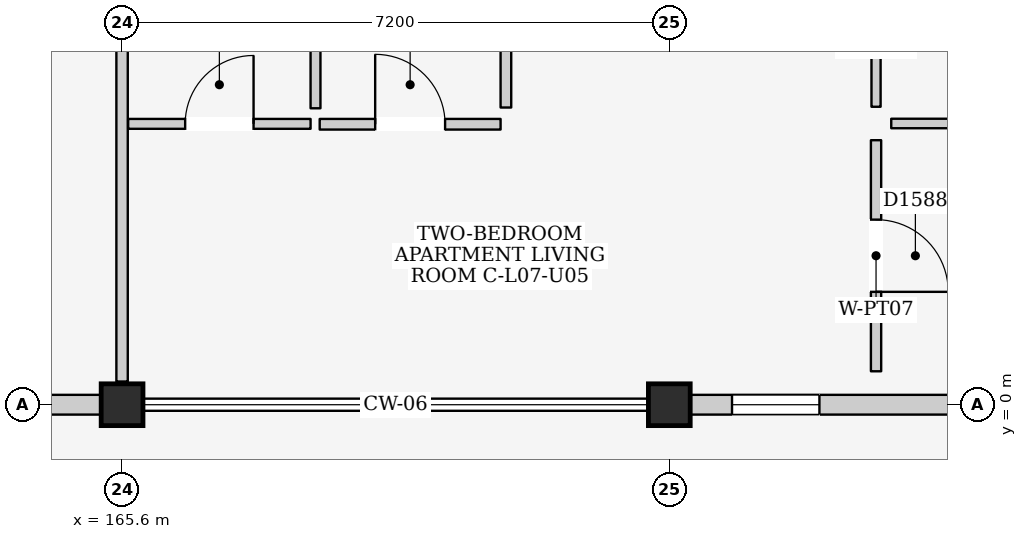
"""IFC4 building model, lengths in metres.
Left out: names, types, materials, properties, quantities, classifications, styles, units other than length and angle.
Written with IfcOpenShell. Run it as: python <this file> out.ifc"""

import sys

from ifc_helpers import new_model, si_unit, direction, frame, frame_2d, origin, origin_2d, place, context, subcontext, project, spatial, rectangle, extrude, element, fill, save


model = new_model("IFC4")
c1 = context("Model", 3, precision=1e-05, world=origin(), true_north=direction((0.0, 1.0)))
c2 = subcontext(c1, "Body", "Model", "MODEL_VIEW")
j1 = project(units=[si_unit("LENGTHUNIT", "METRE"), si_unit("PLANEANGLEUNIT", "RADIAN")], contexts=[c1])
p1 = place(None, origin())
s1 = spatial("IfcSite", under=j1, at=p1, CompositionType="ELEMENT")
p2 = place(p1, origin())
s2 = spatial("IfcBuilding", under=s1, at=p2, CompositionType="ELEMENT")
p3 = place(p2, frame((0.0, 0.0, 25.1)))
s3 = spatial("IfcBuildingStorey", under=s2, at=p3, CompositionType="ELEMENT", Elevation=25.1)
for number, where, z_axis, x_axis in (
    (1, (165.6, 0.0, 0.0), (0.0, 0.0, 1.0), (1.0, 0.0, 0.0)),
    (2, (172.8, 0.0, 0.0), (0.0, 0.0, 1.0), (1.0, 0.0, 0.0)),
):
    element("IfcColumn", number, at=place(p3, frame(where, z_axis=z_axis, x_axis=x_axis)), inside=s3, PredefinedType="COLUMN", context=c2, shape_type="SweptSolid", body=[
        extrude(rectangle(XDim=0.55, YDim=0.55, at=origin_2d()), origin(), (0.0, 0.0, 1.0), 3.2),
    ])
p4 = place(p3, frame((158.675, 0.0, 0.0), z_axis=(0.0, 0.0, 1.0), x_axis=(1.0, 0.0, 0.0)))
e3 = element("IfcWall", 3, at=p4, inside=s3, PredefinedType="ELEMENTEDWALL", context=c2, shape_type="SweptSolid", body=[
    extrude(rectangle(XDim=6.65, YDim=0.26, at=frame_2d((3.325, 0.0))), origin(), (0.0, 0.0, 1.0), 2.525),
])
p5 = place(p4, frame((3.85, 0.0, 0.0)))
e4 = element("IfcOpeningElement", 4, at=p5, cuts=e3, PredefinedType="OPENING", context=c2, shape_type="SweptSolid", body=[
    extrude(rectangle(XDim=1.8, YDim=2.12, at=frame_2d((0.9, 1.06))), frame((0.0, 0.145, 0.0), z_axis=(0.0, -1.0, 0.0), x_axis=(1.0, 0.0, 0.0)), (0.0, 0.0, 1.0), 0.29),
])
p6 = place(p4, frame((0.55, 0.0, 0.865)))
e5 = element("IfcOpeningElement", 5, at=p6, cuts=e3, PredefinedType="OPENING", context=c2, shape_type="SweptSolid", body=[
    extrude(rectangle(XDim=1.95, YDim=1.55, at=frame_2d((0.975, 0.775))), frame((0.0, 0.145, 0.0), z_axis=(0.0, -1.0, 0.0), x_axis=(1.0, 0.0, 0.0)), (0.0, 0.0, 1.0), 0.29),
])
p7 = place(p3, frame((173.075, 0.0, 0.0), z_axis=(0.0, 0.0, 1.0), x_axis=(1.0, 0.0, 0.0)))
e6 = element("IfcWall", 6, at=p7, inside=s3, PredefinedType="ELEMENTEDWALL", context=c2, shape_type="SweptSolid", body=[
    extrude(rectangle(XDim=6.65, YDim=0.26, at=frame_2d((3.325, 0.0))), origin(), (0.0, 0.0, 1.0), 2.525),
])
p8 = place(p7, frame((3.85, 0.0, 0.0)))
e7 = element("IfcOpeningElement", 7, at=p8, cuts=e6, PredefinedType="OPENING", context=c2, shape_type="SweptSolid", body=[
    extrude(rectangle(XDim=1.5, YDim=2.12, at=frame_2d((0.75, 1.06))), frame((0.0, 0.145, 0.0), z_axis=(0.0, -1.0, 0.0), x_axis=(1.0, 0.0, 0.0)), (0.0, 0.0, 1.0), 0.29),
])
p9 = place(p7, frame((0.55, 0.0, 0.9)))
e8 = element("IfcOpeningElement", 8, at=p9, cuts=e6, PredefinedType="OPENING", context=c2, shape_type="SweptSolid", body=[
    extrude(rectangle(XDim=1.15, YDim=1.15, at=frame_2d((0.575, 0.575))), frame((0.0, 0.145, 0.0), z_axis=(0.0, -1.0, 0.0), x_axis=(1.0, 0.0, 0.0)), (0.0, 0.0, 1.0), 0.29),
])
p10 = place(p3, frame((165.6, 0.305, 0.0), z_axis=(0.0, 0.0, 1.0), x_axis=(0.0, 1.0, 0.0)))
e9 = element("IfcWall", 9, at=p10, inside=s3, PredefinedType="PARTITIONING", context=c2, shape_type="SweptSolid", body=[
    extrude(rectangle(XDim=6.59, YDim=0.15, at=frame_2d((3.295, 0.0))), origin(), (0.0, 0.0, 1.0), 2.475),
])
p11 = place(p3, frame((165.68, 3.695, 0.0), z_axis=(0.0, 0.0, 1.0), x_axis=(1.0, 0.0, 0.0)))
e10 = element("IfcWall", 10, at=p11, inside=s3, PredefinedType="PARTITIONING", context=c2, shape_type="SweptSolid", body=[
    extrude(rectangle(XDim=2.4, YDim=0.13, at=frame_2d((1.2, 0.0))), origin(), (0.0, 0.0, 1.0), 2.99),
])
p12 = place(p11, frame((0.75, 0.0, 0.0)))
e11 = element("IfcOpeningElement", 11, at=p12, cuts=e10, PredefinedType="OPENING", context=c2, shape_type="SweptSolid", body=[
    extrude(rectangle(XDim=0.9, YDim=2.1, at=frame_2d((0.45, 1.05))), frame((0.0, 0.08, 0.0), z_axis=(0.0, -1.0, 0.0), x_axis=(1.0, 0.0, 0.0)), (0.0, 0.0, 1.0), 0.16),
])
p13 = place(p3, frame((168.145, 3.9, 0.0), z_axis=(0.0, 0.0, 1.0), x_axis=(0.0, 1.0, 0.0)))
e12 = element("IfcWall", 12, at=p13, inside=s3, PredefinedType="PARTITIONING", context=c2, shape_type="SweptSolid", body=[
    extrude(rectangle(XDim=3.04, YDim=0.13, at=frame_2d((1.52, 0.0))), origin(), (0.0, 0.0, 1.0), 2.99),
])
p14 = place(p3, frame((168.2, 3.69, 0.0), z_axis=(0.0, 0.0, 1.0), x_axis=(1.0, 0.0, 0.0)))
e13 = element("IfcWall", 13, at=p14, inside=s3, PredefinedType="PARTITIONING", context=c2, shape_type="SweptSolid", body=[
    extrude(rectangle(XDim=2.38, YDim=0.14, at=frame_2d((1.19, 0.0))), origin(), (0.0, 0.0, 1.0), 2.99),
])
p15 = place(p14, frame((0.73, 0.0, 0.0)))
e14 = element("IfcOpeningElement", 14, at=p15, cuts=e13, PredefinedType="OPENING", context=c2, shape_type="SweptSolid", body=[
    extrude(rectangle(XDim=0.92, YDim=2.1, at=frame_2d((0.46, 1.05))), frame((0.0, 0.085, 0.0), z_axis=(0.0, -1.0, 0.0), x_axis=(1.0, 0.0, 0.0)), (0.0, 0.0, 1.0), 0.17),
])
p16 = place(p3, frame((170.65, 3.91, 0.0), z_axis=(0.0, 0.0, 1.0), x_axis=(0.0, 1.0, 0.0)))
e15 = element("IfcWall", 15, at=p16, inside=s3, PredefinedType="PARTITIONING", context=c2, shape_type="SweptSolid", body=[
    extrude(rectangle(XDim=3.06, YDim=0.14, at=frame_2d((1.53, 0.0))), origin(), (0.0, 0.0, 1.0), 2.99),
])
p17 = place(p3, frame((175.52, 0.44, 0.0), z_axis=(0.0, 0.0, 1.0), x_axis=(0.0, 1.0, 0.0)))
e16 = element("IfcWall", 16, at=p17, inside=s3, PredefinedType="PARTITIONING", context=c2, shape_type="SweptSolid", body=[
    extrude(rectangle(XDim=3.04, YDim=0.135, at=frame_2d((1.52, 0.0))), origin(), (0.0, 0.0, 1.0), 2.99),
])
p18 = place(p17, frame((1.045, 0.0, 0.0)))
e17 = element("IfcOpeningElement", 17, at=p18, cuts=e16, PredefinedType="OPENING", context=c2, shape_type="SweptSolid", body=[
    extrude(rectangle(XDim=0.95, YDim=2.15, at=frame_2d((0.475, 1.075))), frame((0.0, 0.083, 0.0), z_axis=(0.0, -1.0, 0.0), x_axis=(1.0, 0.0, 0.0)), (0.0, 0.0, 1.0), 0.165),
])
p19 = place(p3, frame((175.72, 3.7, 0.0), z_axis=(0.0, 0.0, 1.0), x_axis=(1.0, 0.0, 0.0)))
e18 = element("IfcWall", 18, at=p19, inside=s3, PredefinedType="PARTITIONING", context=c2, shape_type="SweptSolid", body=[
    extrude(rectangle(XDim=4.06, YDim=0.125, at=frame_2d((2.03, 0.0))), origin(), (0.0, 0.0, 1.0), 2.99),
])
p20 = place(p3, frame((175.52, 3.92, 0.0), z_axis=(0.0, 0.0, 1.0), x_axis=(0.0, 1.0, 0.0)))
e19 = element("IfcWall", 19, at=p20, inside=s3, PredefinedType="PARTITIONING", context=c2, shape_type="SweptSolid", body=[
    extrude(rectangle(XDim=3.04, YDim=0.12, at=frame_2d((1.52, 0.0))), origin(), (0.0, 0.0, 1.0), 2.99),
])
p21 = place(p20, frame((1.04, 0.0, 0.0)))
e20 = element("IfcOpeningElement", 20, at=p21, cuts=e19, PredefinedType="OPENING", context=c2, shape_type="SweptSolid", body=[
    extrude(rectangle(XDim=0.96, YDim=2.15, at=frame_2d((0.48, 1.075))), frame((0.0, 0.075, 0.0), z_axis=(0.0, -1.0, 0.0), x_axis=(1.0, 0.0, 0.0)), (0.0, 0.0, 1.0), 0.15),
])
p22 = place(p9, origin())
e21 = element("IfcWindow", 21, at=p22, inside=s3, PartitioningType="SINGLE_PANEL", PredefinedType="WINDOW", context=c2, shape_type="SweptSolid", body=[
    extrude(rectangle(XDim=1.15, YDim=1.15, at=frame_2d((0.575, 0.575))), frame((0.0, 0.03, 0.0), z_axis=(0.0, -1.0, 0.0), x_axis=(1.0, 0.0, 0.0)), (0.0, 0.0, 1.0), 0.06),
])
fill(e8, e21)
p23 = place(p12, origin())
e22 = element("IfcDoor", 22, at=p23, inside=s3, OperationType="SINGLE_SWING_RIGHT", PredefinedType="DOOR", context=c2, shape_type="SweptSolid", body=[
    extrude(rectangle(XDim=0.9, YDim=2.1, at=frame_2d((0.45, 1.05))), frame((0.0, 0.025, 0.0), z_axis=(0.0, -1.0, 0.0), x_axis=(1.0, 0.0, 0.0)), (0.0, 0.0, 1.0), 0.05),
])
fill(e11, e22)
p24 = place(p15, origin())
e23 = element("IfcDoor", 23, at=p24, inside=s3, OperationType="SINGLE_SWING_LEFT", PredefinedType="DOOR", context=c2, shape_type="SweptSolid", body=[
    extrude(rectangle(XDim=0.92, YDim=2.1, at=frame_2d((0.46, 1.05))), frame((0.0, 0.025, 0.0), z_axis=(0.0, -1.0, 0.0), x_axis=(1.0, 0.0, 0.0)), (0.0, 0.0, 1.0), 0.05),
])
fill(e14, e23)
p25 = place(p18, frame((0.95, 0.0, 0.0), z_axis=(0.0, 0.0, 1.0), x_axis=(-1.0, 0.0, 0.0)))
e24 = element("IfcDoor", 24, at=p25, inside=s3, OperationType="SINGLE_SWING_RIGHT", PredefinedType="DOOR", context=c2, shape_type="SweptSolid", body=[
    extrude(rectangle(XDim=0.95, YDim=2.15, at=frame_2d((0.475, 1.075))), frame((0.0, 0.025, 0.0), z_axis=(0.0, -1.0, 0.0), x_axis=(1.0, 0.0, 0.0)), (0.0, 0.0, 1.0), 0.05),
])
fill(e17, e24)
save(model, sys.argv[1])
